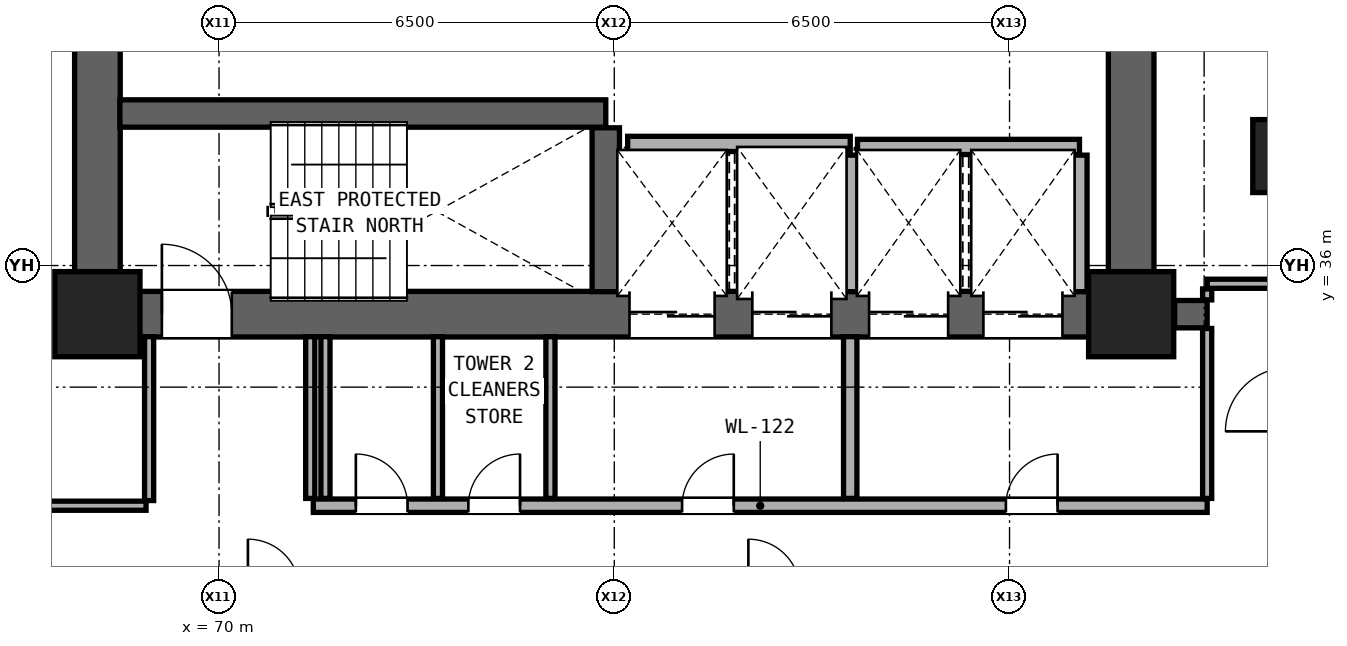
"""IFC4 building model, lengths in metres.
Left out: names, types, materials, properties, quantities, classifications, styles, units other than length and angle.
Written with IfcOpenShell. Run it as: python <this file> out.ifc"""

import sys

from ifc_helpers import new_model, si_unit, direction, frame, frame_2d, origin, origin_2d, place, context, subcontext, project, spatial, rectangle, extrude, element, fill, save


model = new_model("IFC4")
c1 = context("Model", 3, precision=1e-05, world=origin(), true_north=direction((0.0, 1.0)))
c2 = subcontext(c1, "Body", "Model", "MODEL_VIEW")
j1 = project(units=[si_unit("LENGTHUNIT", "METRE"), si_unit("PLANEANGLEUNIT", "RADIAN")], contexts=[c1])
p1 = place(None, origin())
s1 = spatial("IfcSite", under=j1, at=p1, CompositionType="ELEMENT")
p2 = place(p1, origin())
s2 = spatial("IfcBuilding", under=s1, at=p2, CompositionType="ELEMENT")
p3 = place(p2, frame((0.0, 0.0, 32.3)))
s3 = spatial("IfcBuildingStorey", under=s2, at=p3, CompositionType="ELEMENT", Elevation=32.3)
for number, where, z_axis, x_axis in (
    (1, (68.0, 35.2, 0.0), (0.0, 0.0, 1.0), (1.0, 0.0, 0.0)),
    (2, (85.0, 35.2, 0.0), (0.0, 0.0, 1.0), (1.0, 0.0, 0.0)),
):
    element("IfcColumn", number, at=place(p3, frame(where, z_axis=z_axis, x_axis=x_axis)), inside=s3, PredefinedType="COLUMN", context=c2, shape_type="SweptSolid", body=[
        extrude(rectangle(XDim=1.4, YDim=1.4, at=origin_2d()), origin(), (0.0, 0.0, 1.0), 3.3),
    ])
p4 = place(p3, frame((87.4, 37.8, 0.0), z_axis=(0.0, 0.0, 1.0), x_axis=(1.0, 0.0, 0.0)))
e3 = element("IfcColumn", 3, at=p4, inside=s3, PredefinedType="PILASTER", context=c2, shape_type="SweptSolid", body=[
    extrude(rectangle(XDim=0.8, YDim=1.2, at=origin_2d()), origin(), (0.0, 0.0, 1.0), 3.3),
])
for number, where, z_axis, x_axis in (
    (4, (68.0, 35.2, 0.0), (0.0, 0.0, 1.0), (0.0, 1.0, 0.0)),
    (5, (85.0, 35.2, 0.0), (0.0, 0.0, 1.0), (0.0, 1.0, 0.0)),
):
    element("IfcWall", number, at=place(p3, frame(where, z_axis=z_axis, x_axis=x_axis)), inside=s3, PredefinedType="SHEAR", context=c2, shape_type="SweptSolid", body=[
        extrude(rectangle(XDim=5.6, YDim=0.75, at=frame_2d((2.8, 0.0))), origin(), (0.0, 0.0, 1.0), 3.06),
    ])
p5 = place(p3, frame((68.0, 35.2, 0.0), z_axis=(0.0, 0.0, 1.0), x_axis=(1.0, 0.0, 0.0)))
e6 = element("IfcWall", 6, at=p5, inside=s3, PredefinedType="SHEAR", context=c2, shape_type="SweptSolid", body=[
    extrude(rectangle(XDim=17.0, YDim=0.75, at=frame_2d((8.5, 0.0))), origin(), (0.0, 0.0, 1.0), 3.06),
])
p6 = place(p5, frame((1.06, 0.0, 0.0)))
e7 = element("IfcOpeningElement", 7, at=p6, cuts=e6, PredefinedType="OPENING", context=c2, shape_type="SweptSolid", body=[
    extrude(rectangle(XDim=1.15, YDim=2.2, at=frame_2d((0.575, 1.1))), frame((0.0, 0.385, 0.0), z_axis=(0.0, -1.0, 0.0), x_axis=(1.0, 0.0, 0.0)), (0.0, 0.0, 1.0), 0.77),
])
p7 = place(p5, frame((8.75, 0.0, 0.0)))
e8 = element("IfcOpeningElement", 8, at=p7, cuts=e6, PredefinedType="OPENING", context=c2, shape_type="SweptSolid", body=[
    extrude(rectangle(XDim=1.4, YDim=2.35, at=frame_2d((0.7, 1.175))), frame((0.0, 0.385, 0.0), z_axis=(0.0, -1.0, 0.0), x_axis=(1.0, 0.0, 0.0)), (0.0, 0.0, 1.0), 0.77),
])
p8 = place(p5, frame((10.77, 0.0, 0.0)))
e9 = element("IfcOpeningElement", 9, at=p8, cuts=e6, PredefinedType="OPENING", context=c2, shape_type="SweptSolid", body=[
    extrude(rectangle(XDim=1.3, YDim=2.3, at=frame_2d((0.65, 1.15))), frame((0.0, 0.385, 0.0), z_axis=(0.0, -1.0, 0.0), x_axis=(1.0, 0.0, 0.0)), (0.0, 0.0, 1.0), 0.77),
])
p9 = place(p5, frame((12.69, 0.0, 0.0)))
e10 = element("IfcOpeningElement", 10, at=p9, cuts=e6, PredefinedType="OPENING", context=c2, shape_type="SweptSolid", body=[
    extrude(rectangle(XDim=1.3, YDim=2.3, at=frame_2d((0.65, 1.15))), frame((0.0, 0.385, 0.0), z_axis=(0.0, -1.0, 0.0), x_axis=(1.0, 0.0, 0.0)), (0.0, 0.0, 1.0), 0.77),
])
p10 = place(p5, frame((14.57, 0.0, 0.0)))
e11 = element("IfcOpeningElement", 11, at=p10, cuts=e6, PredefinedType="OPENING", context=c2, shape_type="SweptSolid", body=[
    extrude(rectangle(XDim=1.3, YDim=2.3, at=frame_2d((0.65, 1.15))), frame((0.0, 0.385, 0.0), z_axis=(0.0, -1.0, 0.0), x_axis=(1.0, 0.0, 0.0)), (0.0, 0.0, 1.0), 0.77),
])
p11 = place(p3, frame((66.62, 32.05, 0.0), z_axis=(0.0, 0.0, 1.0), x_axis=(1.0, 0.0, 0.0)))
e12 = element("IfcWall", 12, at=p11, inside=s3, PredefinedType="PARTITIONING", context=c2, shape_type="SweptSolid", body=[
    extrude(rectangle(XDim=2.18, YDim=0.15, at=frame_2d((1.09, 0.0))), origin(), (0.0, 0.0, 1.0), 2.125),
])
p12 = place(p3, frame((71.55, 32.05, 0.0), z_axis=(0.0, 0.0, 1.0), x_axis=(1.0, 0.0, 0.0)))
e13 = element("IfcWall", 13, at=p12, inside=s3, PredefinedType="SOLIDWALL", context=c2, shape_type="SweptSolid", body=[
    extrude(rectangle(XDim=14.7, YDim=0.22, at=frame_2d((7.35, 0.0))), origin(), (0.0, 0.0, 1.0), 2.125),
])
p13 = place(p12, frame((11.39, 0.0, 0.0)))
e14 = element("IfcOpeningElement", 14, at=p13, cuts=e13, PredefinedType="OPENING", context=c2, shape_type="SweptSolid", body=[
    extrude(rectangle(XDim=0.85, YDim=2.01, at=frame_2d((0.425, 1.005))), frame((0.0, 0.12, 0.0), z_axis=(0.0, -1.0, 0.0), x_axis=(1.0, 0.0, 0.0)), (0.0, 0.0, 1.0), 0.24),
])
p14 = place(p12, frame((6.065, 0.0, 0.0)))
e15 = element("IfcOpeningElement", 15, at=p14, cuts=e13, PredefinedType="OPENING", context=c2, shape_type="SweptSolid", body=[
    extrude(rectangle(XDim=0.85, YDim=2.01, at=frame_2d((0.425, 1.005))), frame((0.0, 0.12, 0.0), z_axis=(0.0, -1.0, 0.0), x_axis=(1.0, 0.0, 0.0)), (0.0, 0.0, 1.0), 0.24),
])
p15 = place(p12, frame((0.7, 0.0, 0.0)))
e16 = element("IfcOpeningElement", 16, at=p15, cuts=e13, PredefinedType="OPENING", context=c2, shape_type="SweptSolid", body=[
    extrude(rectangle(XDim=0.85, YDim=2.01, at=frame_2d((0.425, 1.005))), frame((0.0, 0.12, 0.0), z_axis=(0.0, -1.0, 0.0), x_axis=(1.0, 0.0, 0.0)), (0.0, 0.0, 1.0), 0.24),
])
p16 = place(p12, frame((2.55, 0.0, 0.0)))
e17 = element("IfcOpeningElement", 17, at=p16, cuts=e13, PredefinedType="OPENING", context=c2, shape_type="SweptSolid", body=[
    extrude(rectangle(XDim=0.85, YDim=2.01, at=frame_2d((0.425, 1.005))), frame((0.0, 0.12, 0.0), z_axis=(0.0, -1.0, 0.0), x_axis=(1.0, 0.0, 0.0)), (0.0, 0.0, 1.0), 0.24),
])
p17 = place(p3, frame((85.715, 35.2, 0.0), z_axis=(0.0, 0.0, 1.0), x_axis=(1.0, 0.0, 0.0)))
e18 = element("IfcWall", 18, at=p17, inside=s3, PredefinedType="SHEAR", context=c2, shape_type="SweptSolid", body=[
    extrude(rectangle(XDim=0.535, YDim=0.45, at=frame_2d((0.268, 0.0))), origin(), (0.0, 0.0, 1.0), 3.06),
])
p18 = place(p3, frame((86.25, 35.7, 0.0), z_axis=(0.0, 0.0, 1.0), x_axis=(1.0, 0.0, 0.0)))
e19 = element("IfcWall", 19, at=p18, inside=s3, PredefinedType="PARTITIONING", context=c2, shape_type="SweptSolid", body=[
    extrude(rectangle(XDim=1.35, YDim=0.15, at=frame_2d((0.675, 0.0))), origin(), (0.0, 0.0, 1.0), 3.06),
])
p19 = place(p3, frame((80.5, 37.95, 0.0), z_axis=(0.0, 0.0, 1.0), x_axis=(1.0, 0.0, 0.0)))
e20 = element("IfcWall", 20, at=p19, inside=s3, PredefinedType="SOLIDWALL", context=c2, shape_type="SweptSolid", body=[
    extrude(rectangle(XDim=3.65, YDim=0.25, at=frame_2d((1.825, 0.0))), origin(), (0.0, 0.0, 1.0), 3.06),
])
p20 = place(p3, frame((76.72, 38.0, 0.0), z_axis=(0.0, 0.0, 1.0), x_axis=(1.0, 0.0, 0.0)))
e21 = element("IfcWall", 21, at=p20, inside=s3, PredefinedType="SOLIDWALL", context=c2, shape_type="SweptSolid", body=[
    extrude(rectangle(XDim=3.66, YDim=0.25, at=frame_2d((1.83, 0.0))), origin(), (0.0, 0.0, 1.0), 3.06),
])
p21 = place(p3, frame((68.37, 38.5, 0.0), z_axis=(0.0, 0.0, 1.0), x_axis=(1.0, 0.0, 0.0)))
e22 = element("IfcWall", 22, at=p21, inside=s3, PredefinedType="SHEAR", context=c2, shape_type="SweptSolid", body=[
    extrude(rectangle(XDim=7.99, YDim=0.45, at=frame_2d((3.995, 0.0))), origin(), (0.0, 0.0, 1.0), 3.06),
])
p22 = place(p3, frame((68.85, 32.135, 0.0), z_axis=(0.0, 0.0, 1.0), x_axis=(0.0, 1.0, 0.0)))
e23 = element("IfcWall", 23, at=p22, inside=s3, PredefinedType="PARTITIONING", context=c2, shape_type="SweptSolid", body=[
    extrude(rectangle(XDim=2.695, YDim=0.15, at=frame_2d((1.348, 0.0))), origin(), (0.0, 0.0, 1.0), 3.06),
])
for number, where, z_axis, x_axis in (
    (24, (71.5, 32.17, 0.0), (0.0, 0.0, 1.0), (0.0, 1.0, 0.0)),
    (25, (71.75, 32.17, 0.0), (0.0, 0.0, 1.0), (0.0, 1.0, 0.0)),
    (26, (73.6, 32.17, 0.0), (0.0, 0.0, 1.0), (0.0, 1.0, 0.0)),
    (27, (75.45, 32.17, 0.0), (0.0, 0.0, 1.0), (0.0, 1.0, 0.0)),
):
    element("IfcWall", number, at=place(p3, frame(where, z_axis=z_axis, x_axis=x_axis)), inside=s3, PredefinedType="PARTITIONING", context=c2, shape_type="SweptSolid", body=[
        extrude(rectangle(XDim=2.66, YDim=0.15, at=frame_2d((1.33, 0.0))), origin(), (0.0, 0.0, 1.0), 3.06),
    ])
p23 = place(p3, frame((76.36, 35.57, 0.0), z_axis=(0.0, 0.0, 1.0), x_axis=(0.0, 1.0, 0.0)))
e28 = element("IfcWall", 28, at=p23, inside=s3, PredefinedType="SHEAR", context=c2, shape_type="SweptSolid", body=[
    extrude(rectangle(XDim=2.695, YDim=0.45, at=frame_2d((1.347, 0.0))), origin(), (0.0, 0.0, 1.0), 3.06),
])
p24 = place(p3, frame((80.38, 32.17, 0.0), z_axis=(0.0, 0.0, 1.0), x_axis=(0.0, 1.0, 0.0)))
e29 = element("IfcWall", 29, at=p24, inside=s3, PredefinedType="SOLIDWALL", context=c2, shape_type="SweptSolid", body=[
    extrude(rectangle(XDim=2.66, YDim=0.22, at=frame_2d((1.33, 0.0))), origin(), (0.0, 0.0, 1.0), 3.06),
])
for number, where, z_axis, x_axis in (
    (30, (80.38, 35.57, 0.0), (0.0, 0.0, 1.0), (0.0, 1.0, 0.0)),
    (31, (84.15, 35.57, 0.0), (0.0, 0.0, 1.0), (0.0, 1.0, 0.0)),
):
    element("IfcWall", number, at=place(p3, frame(where, z_axis=z_axis, x_axis=x_axis)), inside=s3, PredefinedType="SOLIDWALL", context=c2, shape_type="SweptSolid", body=[
        extrude(rectangle(XDim=2.245, YDim=0.25, at=frame_2d((1.123, 0.0))), origin(), (0.0, 0.0, 1.0), 3.06),
    ])
p25 = place(p3, frame((86.25, 32.17, 0.0), z_axis=(0.0, 0.0, 1.0), x_axis=(0.0, 1.0, 0.0)))
e32 = element("IfcWall", 32, at=p25, inside=s3, PredefinedType="PARTITIONING", context=c2, shape_type="SweptSolid", body=[
    extrude(rectangle(XDim=2.795, YDim=0.15, at=frame_2d((1.397, 0.0))), origin(), (0.0, 0.0, 1.0), 2.452),
])
p26 = place(p3, frame((86.25, 35.435, 0.0), z_axis=(0.0, 0.0, 1.0), x_axis=(0.0, 1.0, 0.0)))
e33 = element("IfcWall", 33, at=p26, inside=s3, PredefinedType="PARTITIONING", context=c2, shape_type="SweptSolid", body=[
    extrude(rectangle(XDim=0.18, YDim=0.15, at=frame_2d((0.09, 0.0))), origin(), (0.0, 0.0, 1.0), 2.452),
])
p27 = place(p13, origin())
e34 = element("IfcDoor", 34, at=p27, inside=s3, OperationType="SINGLE_SWING_RIGHT", PredefinedType="DOOR", context=c2, shape_type="SweptSolid", body=[
    extrude(rectangle(XDim=0.85, YDim=2.01, at=frame_2d((0.425, 1.005))), frame((0.0, 0.025, 0.0), z_axis=(0.0, -1.0, 0.0), x_axis=(1.0, 0.0, 0.0)), (0.0, 0.0, 1.0), 0.05),
])
fill(e14, e34)
p28 = place(p6, origin())
e35 = element("IfcDoor", 35, at=p28, inside=s3, OperationType="SINGLE_SWING_LEFT", PredefinedType="DOOR", context=c2, shape_type="SweptSolid", body=[
    extrude(rectangle(XDim=1.15, YDim=2.2, at=frame_2d((0.575, 1.1))), frame((0.0, 0.025, 0.0), z_axis=(0.0, -1.0, 0.0), x_axis=(1.0, 0.0, 0.0)), (0.0, 0.0, 1.0), 0.05),
])
fill(e7, e35)
p29 = place(p14, origin())
e36 = element("IfcDoor", 36, at=p29, inside=s3, OperationType="SINGLE_SWING_RIGHT", PredefinedType="DOOR", context=c2, shape_type="SweptSolid", body=[
    extrude(rectangle(XDim=0.85, YDim=2.01, at=frame_2d((0.425, 1.005))), frame((0.0, 0.025, 0.0), z_axis=(0.0, -1.0, 0.0), x_axis=(1.0, 0.0, 0.0)), (0.0, 0.0, 1.0), 0.05),
])
fill(e15, e36)
p30 = place(p15, origin())
e37 = element("IfcDoor", 37, at=p30, inside=s3, OperationType="SINGLE_SWING_LEFT", PredefinedType="DOOR", context=c2, shape_type="SweptSolid", body=[
    extrude(rectangle(XDim=0.85, YDim=2.01, at=frame_2d((0.425, 1.005))), frame((0.0, 0.025, 0.0), z_axis=(0.0, -1.0, 0.0), x_axis=(1.0, 0.0, 0.0)), (0.0, 0.0, 1.0), 0.05),
])
fill(e16, e37)
p31 = place(p16, origin())
e38 = element("IfcDoor", 38, at=p31, inside=s3, OperationType="SINGLE_SWING_RIGHT", PredefinedType="DOOR", context=c2, shape_type="SweptSolid", body=[
    extrude(rectangle(XDim=0.85, YDim=2.01, at=frame_2d((0.425, 1.005))), frame((0.0, 0.025, 0.0), z_axis=(0.0, -1.0, 0.0), x_axis=(1.0, 0.0, 0.0)), (0.0, 0.0, 1.0), 0.05),
])
fill(e17, e38)
p32 = place(p7, origin())
e39 = element("IfcDoor", 39, at=p32, inside=s3, OperationType="DOUBLE_DOOR_SLIDING", PredefinedType="DOOR", context=c2, shape_type="SweptSolid", body=[
    extrude(rectangle(XDim=1.4, YDim=2.35, at=frame_2d((0.7, 1.175))), frame((0.0, 0.025, 0.0), z_axis=(0.0, -1.0, 0.0), x_axis=(1.0, 0.0, 0.0)), (0.0, 0.0, 1.0), 0.05),
])
fill(e8, e39)
p33 = place(p8, origin())
e40 = element("IfcDoor", 40, at=p33, inside=s3, OperationType="DOUBLE_DOOR_SLIDING", PredefinedType="DOOR", context=c2, shape_type="SweptSolid", body=[
    extrude(rectangle(XDim=1.3, YDim=2.3, at=frame_2d((0.65, 1.15))), frame((0.0, 0.025, 0.0), z_axis=(0.0, -1.0, 0.0), x_axis=(1.0, 0.0, 0.0)), (0.0, 0.0, 1.0), 0.05),
])
fill(e9, e40)
p34 = place(p9, origin())
e41 = element("IfcDoor", 41, at=p34, inside=s3, OperationType="DOUBLE_DOOR_SLIDING", PredefinedType="DOOR", context=c2, shape_type="SweptSolid", body=[
    extrude(rectangle(XDim=1.3, YDim=2.3, at=frame_2d((0.65, 1.15))), frame((0.0, 0.025, 0.0), z_axis=(0.0, -1.0, 0.0), x_axis=(1.0, 0.0, 0.0)), (0.0, 0.0, 1.0), 0.05),
])
fill(e10, e41)
p35 = place(p10, origin())
e42 = element("IfcDoor", 42, at=p35, inside=s3, OperationType="DOUBLE_DOOR_SLIDING", PredefinedType="DOOR", context=c2, shape_type="SweptSolid", body=[
    extrude(rectangle(XDim=1.3, YDim=2.3, at=frame_2d((0.65, 1.15))), frame((0.0, 0.025, 0.0), z_axis=(0.0, -1.0, 0.0), x_axis=(1.0, 0.0, 0.0)), (0.0, 0.0, 1.0), 0.05),
])
fill(e11, e42)
save(model, sys.argv[1])
